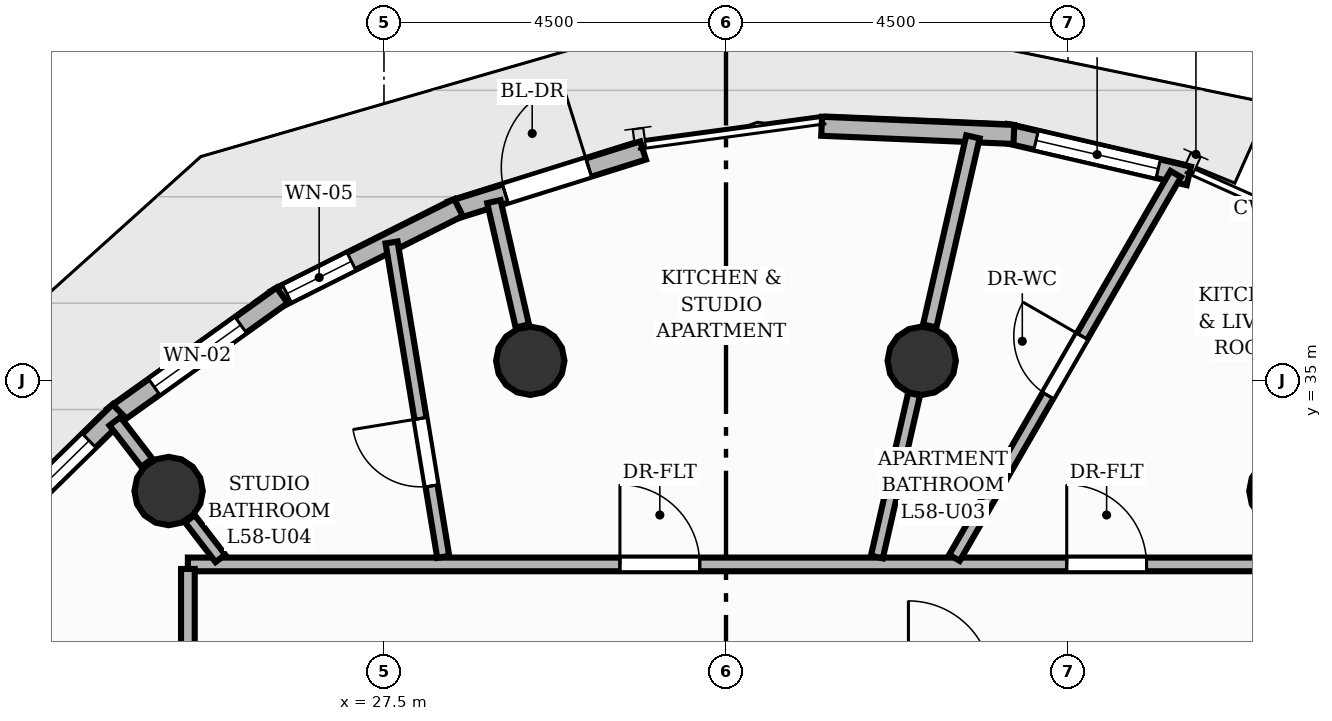
"""IFC4 building model, lengths in metres.
Left out: names, types, materials, properties, quantities, classifications, styles, units other than length and angle.
Written with IfcOpenShell. Run it as: python <this file> out.ifc"""

import sys

from ifc_helpers import new_model, si_unit, direction, frame, frame_2d, origin, origin_2d, place, context, subcontext, project, spatial, rectangle, circle, extrude, element, fill, save


model = new_model("IFC4")
c1 = context("Model", 3, precision=1e-05, world=origin(), true_north=direction((0.0, 1.0)))
c2 = subcontext(c1, "Body", "Model", "MODEL_VIEW")
j1 = project(units=[si_unit("LENGTHUNIT", "METRE"), si_unit("PLANEANGLEUNIT", "RADIAN")], contexts=[c1])
p1 = place(None, origin())
s1 = spatial("IfcSite", under=j1, at=p1, CompositionType="ELEMENT")
p2 = place(p1, origin())
s2 = spatial("IfcBuilding", under=s1, at=p2, CompositionType="ELEMENT")
p3 = place(p2, frame((0.0, 0.0, 195.04)))
s3 = spatial("IfcBuildingStorey", under=s2, at=p3, CompositionType="ELEMENT", Elevation=195.04)
for number, where, z_axis, x_axis in (
    (1, (39.333, 33.545, 0.0), (0.0, 0.0, 1.0), (1.0, 0.0, 0.0)),
    (2, (34.575, 35.26, 0.0), (0.0, 0.0, 1.0), (1.0, 0.0, 0.0)),
    (3, (29.425, 35.26, 0.0), (0.0, 0.0, 1.0), (1.0, 0.0, 0.0)),
    (4, (24.667, 33.545, 0.0), (0.0, 0.0, 1.0), (1.0, 0.0, 0.0)),
):
    element("IfcColumn", number, at=place(p3, frame(where, z_axis=z_axis, x_axis=x_axis)), inside=s3, PredefinedType="COLUMN", context=c2, shape_type="SweptSolid", body=[
        extrude(circle(Radius=0.45, at=origin_2d()), origin(), (0.0, 0.0, 1.0), 3.2),
    ])
p4 = place(p3, frame((35.676, 38.253, 0.0), z_axis=(0.0, 0.0, 1.0), x_axis=(0.974096425092, -0.226133046286, 0.0)))
e5 = element("IfcWall", 5, at=p4, inside=s3, PredefinedType="SOLIDWALL", context=c2, shape_type="SweptSolid", body=[
    extrude(rectangle(XDim=2.478, YDim=0.25, at=frame_2d((1.239, 0.0))), origin(), (0.0, 0.0, 1.0), 2.96),
])
p5 = place(p4, frame((0.414, 0.0, 0.85)))
e6 = element("IfcOpeningElement", 6, at=p5, cuts=e5, PredefinedType="OPENING", context=c2, shape_type="SweptSolid", body=[
    extrude(rectangle(XDim=1.65, YDim=1.55, at=frame_2d((0.825, 0.775))), frame((0.0, 0.135, 0.0), z_axis=(0.0, -1.0, 0.0), x_axis=(1.0, 0.0, 0.0)), (0.0, 0.0, 1.0), 0.27),
])
p6 = place(p3, frame((33.258, 38.345, 0.0), z_axis=(0.0, 0.0, 1.0), x_axis=(0.999099670747, -0.042424614469, 0.0)))
e7 = element("IfcWall", 7, at=p6, inside=s3, PredefinedType="SOLIDWALL", context=c2, shape_type="SweptSolid", body=[
    extrude(rectangle(XDim=2.532, YDim=0.25, at=frame_2d((1.266, 0.0))), origin(), (0.0, 0.0, 1.0), 2.96),
])
p7 = place(p3, frame((28.379, 37.234, 0.0), z_axis=(0.0, 0.0, 1.0), x_axis=(0.954307768746, 0.298825505122, 0.0)))
e8 = element("IfcWall", 8, at=p7, inside=s3, PredefinedType="SOLIDWALL", context=c2, shape_type="SweptSolid", body=[
    extrude(rectangle(XDim=2.651, YDim=0.25, at=frame_2d((1.326, 0.0))), origin(), (0.0, 0.0, 1.0), 2.96),
])
p8 = place(p7, frame((0.751, 0.0, 0.0)))
e9 = element("IfcOpeningElement", 9, at=p8, cuts=e8, PredefinedType="OPENING", context=c2, shape_type="SweptSolid", body=[
    extrude(rectangle(XDim=1.15, YDim=2.2, at=frame_2d((0.575, 1.1))), frame((0.0, 0.135, 0.0), z_axis=(0.0, -1.0, 0.0), x_axis=(1.0, 0.0, 0.0)), (0.0, 0.0, 1.0), 0.27),
])
p9 = place(p3, frame((26.066, 36.063, 0.0), z_axis=(0.0, 0.0, 1.0), x_axis=(0.893757522153, 0.448550433724, 0.0)))
e10 = element("IfcWall", 10, at=p9, inside=s3, PredefinedType="SOLIDWALL", context=c2, shape_type="SweptSolid", body=[
    extrude(rectangle(XDim=2.702, YDim=0.25, at=frame_2d((1.351, 0.0))), origin(), (0.0, 0.0, 1.0), 2.96),
])
p10 = place(p9, frame((0.175, 0.0, 0.85)))
e11 = element("IfcOpeningElement", 11, at=p10, cuts=e10, PredefinedType="OPENING", context=c2, shape_type="SweptSolid", body=[
    extrude(rectangle(XDim=0.95, YDim=1.45, at=frame_2d((0.475, 0.725))), frame((0.0, 0.135, 0.0), z_axis=(0.0, -1.0, 0.0), x_axis=(1.0, 0.0, 0.0)), (0.0, 0.0, 1.0), 0.27),
])
p11 = place(p3, frame((23.934, 34.526, 0.0), z_axis=(0.0, 0.0, 1.0), x_axis=(0.812997900305, 0.58226661771, 0.0)))
e12 = element("IfcWall", 12, at=p11, inside=s3, PredefinedType="SOLIDWALL", context=c2, shape_type="SweptSolid", body=[
    extrude(rectangle(XDim=2.739, YDim=0.25, at=frame_2d((1.369, 0.0))), origin(), (0.0, 0.0, 1.0), 2.96),
])
p12 = place(p11, frame((0.669, 0.0, 0.85)))
e13 = element("IfcOpeningElement", 13, at=p12, cuts=e12, PredefinedType="OPENING", context=c2, shape_type="SweptSolid", body=[
    extrude(rectangle(XDim=1.4, YDim=1.55, at=frame_2d((0.7, 0.775))), frame((0.0, 0.135, 0.0), z_axis=(0.0, -1.0, 0.0), x_axis=(1.0, 0.0, 0.0)), (0.0, 0.0, 1.0), 0.27),
])
p13 = place(p3, frame((22.045, 32.667, 0.0), z_axis=(0.0, 0.0, 1.0), x_axis=(0.71485422762, 0.699273503898, 0.0)))
e14 = element("IfcWall", 14, at=p13, inside=s3, PredefinedType="SOLIDWALL", context=c2, shape_type="SweptSolid", body=[
    extrude(rectangle(XDim=2.758, YDim=0.25, at=frame_2d((1.379, 0.0))), origin(), (0.0, 0.0, 1.0), 2.96),
])
p14 = place(p13, frame((0.554, 0.0, 0.85)))
e15 = element("IfcOpeningElement", 15, at=p14, cuts=e14, PredefinedType="OPENING", context=c2, shape_type="SweptSolid", body=[
    extrude(rectangle(XDim=1.65, YDim=1.55, at=frame_2d((0.825, 0.775))), frame((0.0, 0.135, 0.0), z_axis=(0.0, -1.0, 0.0), x_axis=(1.0, 0.0, 0.0)), (0.0, 0.0, 1.0), 0.27),
])
p15 = place(p3, frame((34.68, 35.718, 0.0), z_axis=(0.0, 0.0, 1.0), x_axis=(0.22299363946, 0.974819899654, 0.0)))
e16 = element("IfcWall", 16, at=p15, inside=s3, PredefinedType="PARTITIONING", context=c2, shape_type="SweptSolid", body=[
    extrude(rectangle(XDim=2.552, YDim=0.18, at=frame_2d((1.276, 0.0))), origin(), (0.0, 0.0, 1.0), 2.403),
])
p16 = place(p3, frame((29.32, 35.718, 0.0), z_axis=(0.0, 0.0, 1.0), x_axis=(-0.222978827263, 0.97482328788, 0.0)))
e17 = element("IfcWall", 17, at=p16, inside=s3, PredefinedType="PARTITIONING", context=c2, shape_type="SweptSolid", body=[
    extrude(rectangle(XDim=1.678, YDim=0.18, at=frame_2d((0.839, 0.0))), origin(), (0.0, 0.0, 1.0), 2.403),
])
p17 = place(p3, frame((24.38, 33.918, 0.0), z_axis=(0.0, 0.0, 1.0), x_axis=(-0.60904199592, 0.793137974885, 0.0)))
e18 = element("IfcWall", 18, at=p17, inside=s3, PredefinedType="PARTITIONING", context=c2, shape_type="SweptSolid", body=[
    extrude(rectangle(XDim=0.688, YDim=0.18, at=frame_2d((0.344, 0.0))), origin(), (0.0, 0.0, 1.0), 2.403),
])
p18 = place(p3, frame((24.92, 32.58, 0.0), z_axis=(0.0, 0.0, 1.0), x_axis=(1.0, 0.0, 0.0)))
e19 = element("IfcWall", 19, at=p18, inside=s3, PredefinedType="PARTITIONING", context=c2, shape_type="SweptSolid", body=[
    extrude(rectangle(XDim=14.16, YDim=0.18, at=frame_2d((7.08, 0.0))), origin(), (0.0, 0.0, 1.0), 2.955),
])
p19 = place(p18, frame((11.563, 0.0, 0.0)))
e20 = element("IfcOpeningElement", 20, at=p19, cuts=e19, PredefinedType="OPENING", context=c2, shape_type="SweptSolid", body=[
    extrude(rectangle(XDim=1.05, YDim=2.15, at=frame_2d((0.525, 1.075))), frame((0.0, 0.1, 0.0), z_axis=(0.0, -1.0, 0.0), x_axis=(1.0, 0.0, 0.0)), (0.0, 0.0, 1.0), 0.2),
])
p20 = place(p18, frame((5.684, 0.0, 0.0)))
e21 = element("IfcOpeningElement", 21, at=p20, cuts=e19, PredefinedType="OPENING", context=c2, shape_type="SweptSolid", body=[
    extrude(rectangle(XDim=1.05, YDim=2.15, at=frame_2d((0.525, 1.075))), frame((0.0, 0.1, 0.0), z_axis=(0.0, -1.0, 0.0), x_axis=(1.0, 0.0, 0.0)), (0.0, 0.0, 1.0), 0.2),
])
p21 = place(p3, frame((24.92, 26.46, 0.0), z_axis=(0.0, 0.0, 1.0), x_axis=(0.0, 1.0, 0.0)))
e22 = element("IfcWall", 22, at=p21, inside=s3, PredefinedType="PARTITIONING", context=c2, shape_type="SweptSolid", body=[
    extrude(rectangle(XDim=6.06, YDim=0.18, at=frame_2d((3.03, 0.0))), origin(), (0.0, 0.0, 1.0), 2.955),
])
p22 = place(p3, frame((35.005, 32.667, 0.0), z_axis=(0.0, 0.0, 1.0), x_axis=(0.499495237235, 0.866316632635, 0.0)))
e23 = element("IfcWall", 23, at=p22, inside=s3, PredefinedType="PLUMBINGWALL", context=c2, shape_type="SweptSolid", body=[
    extrude(rectangle(XDim=5.83, YDim=0.16, at=frame_2d((2.915, 0.0))), origin(), (0.0, 0.0, 1.0), 2.692),
])
p23 = place(p22, frame((2.465, 0.0, 0.0)))
e24 = element("IfcOpeningElement", 24, at=p23, cuts=e23, PredefinedType="OPENING", context=c2, shape_type="SweptSolid", body=[
    extrude(rectangle(XDim=0.9, YDim=2.1, at=frame_2d((0.45, 1.05))), frame((0.0, 0.09, 0.0), z_axis=(0.0, -1.0, 0.0), x_axis=(1.0, 0.0, 0.0)), (0.0, 0.0, 1.0), 0.18),
])
p24 = place(p3, frame((33.985, 32.677, 0.0), z_axis=(0.0, 0.0, 1.0), x_axis=(0.222969522248, 0.974825416241, 0.0)))
e25 = element("IfcWall", 25, at=p24, inside=s3, PredefinedType="PLUMBINGWALL", context=c2, shape_type="SweptSolid", body=[
    extrude(rectangle(XDim=2.199, YDim=0.16, at=frame_2d((1.099, 0.0))), origin(), (0.0, 0.0, 1.0), 2.403),
])
p25 = place(p3, frame((28.28, 32.679, 0.0), z_axis=(0.0, 0.0, 1.0), x_axis=(-0.162160778545, 0.986764349732, 0.0)))
e26 = element("IfcWall", 26, at=p25, inside=s3, PredefinedType="PLUMBINGWALL", context=c2, shape_type="SweptSolid", body=[
    extrude(rectangle(XDim=4.193, YDim=0.16, at=frame_2d((2.096, 0.0))), origin(), (0.0, 0.0, 1.0), 2.692),
])
p26 = place(p25, frame((0.947, 0.0, 0.0)))
e27 = element("IfcOpeningElement", 27, at=p26, cuts=e26, PredefinedType="OPENING", context=c2, shape_type="SweptSolid", body=[
    extrude(rectangle(XDim=0.9, YDim=2.1, at=frame_2d((0.45, 1.05))), frame((0.0, 0.09, 0.0), z_axis=(0.0, -1.0, 0.0), x_axis=(1.0, 0.0, 0.0)), (0.0, 0.0, 1.0), 0.18),
])
p27 = place(p3, frame((25.347, 32.659, 0.0), z_axis=(0.0, 0.0, 1.0), x_axis=(-0.609101063055, 0.79309261438, 0.0)))
e28 = element("IfcWall", 28, at=p27, inside=s3, PredefinedType="PLUMBINGWALL", context=c2, shape_type="SweptSolid", body=[
    extrude(rectangle(XDim=0.658, YDim=0.16, at=frame_2d((0.329, 0.0))), origin(), (0.0, 0.0, 1.0), 2.403),
])
p28 = place(p8, origin())
e29 = element("IfcDoor", 29, at=p28, inside=s3, OperationType="SINGLE_SWING_RIGHT", PredefinedType="DOOR", context=c2, shape_type="SweptSolid", body=[
    extrude(rectangle(XDim=1.15, YDim=2.2, at=frame_2d((0.575, 1.1))), frame((0.0, 0.025, 0.0), z_axis=(0.0, -1.0, 0.0), x_axis=(1.0, 0.0, 0.0)), (0.0, 0.0, 1.0), 0.05),
])
fill(e9, e29)
p29 = place(p5, origin())
e30 = element("IfcWindow", 30, at=p29, inside=s3, PartitioningType="SINGLE_PANEL", PredefinedType="WINDOW", context=c2, shape_type="SweptSolid", body=[
    extrude(rectangle(XDim=1.65, YDim=1.55, at=frame_2d((0.825, 0.775))), frame((0.0, 0.03, 0.0), z_axis=(0.0, -1.0, 0.0), x_axis=(1.0, 0.0, 0.0)), (0.0, 0.0, 1.0), 0.06),
])
fill(e6, e30)
p30 = place(p10, origin())
e31 = element("IfcWindow", 31, at=p30, inside=s3, PartitioningType="SINGLE_PANEL", PredefinedType="WINDOW", context=c2, shape_type="SweptSolid", body=[
    extrude(rectangle(XDim=0.95, YDim=1.45, at=frame_2d((0.475, 0.725))), frame((0.0, 0.03, 0.0), z_axis=(0.0, -1.0, 0.0), x_axis=(1.0, 0.0, 0.0)), (0.0, 0.0, 1.0), 0.06),
])
fill(e11, e31)
p31 = place(p12, origin())
e32 = element("IfcWindow", 32, at=p31, inside=s3, PartitioningType="SINGLE_PANEL", PredefinedType="WINDOW", context=c2, shape_type="SweptSolid", body=[
    extrude(rectangle(XDim=1.4, YDim=1.55, at=frame_2d((0.7, 0.775))), frame((0.0, 0.03, 0.0), z_axis=(0.0, -1.0, 0.0), x_axis=(1.0, 0.0, 0.0)), (0.0, 0.0, 1.0), 0.06),
])
fill(e13, e32)
p32 = place(p14, origin())
e33 = element("IfcWindow", 33, at=p32, inside=s3, PartitioningType="SINGLE_PANEL", PredefinedType="WINDOW", context=c2, shape_type="SweptSolid", body=[
    extrude(rectangle(XDim=1.65, YDim=1.55, at=frame_2d((0.825, 0.775))), frame((0.0, 0.03, 0.0), z_axis=(0.0, -1.0, 0.0), x_axis=(1.0, 0.0, 0.0)), (0.0, 0.0, 1.0), 0.06),
])
fill(e15, e33)
p33 = place(p19, origin())
e34 = element("IfcDoor", 34, at=p33, inside=s3, OperationType="SINGLE_SWING_LEFT", PredefinedType="DOOR", context=c2, shape_type="SweptSolid", body=[
    extrude(rectangle(XDim=1.05, YDim=2.15, at=frame_2d((0.525, 1.075))), frame((0.0, 0.025, 0.0), z_axis=(0.0, -1.0, 0.0), x_axis=(1.0, 0.0, 0.0)), (0.0, 0.0, 1.0), 0.05),
])
fill(e20, e34)
p34 = place(p23, origin())
e35 = element("IfcDoor", 35, at=p34, inside=s3, OperationType="SINGLE_SWING_RIGHT", PredefinedType="DOOR", context=c2, shape_type="SweptSolid", body=[
    extrude(rectangle(XDim=0.9, YDim=2.1, at=frame_2d((0.45, 1.05))), frame((0.0, 0.025, 0.0), z_axis=(0.0, -1.0, 0.0), x_axis=(1.0, 0.0, 0.0)), (0.0, 0.0, 1.0), 0.05),
])
fill(e24, e35)
p35 = place(p20, origin())
e36 = element("IfcDoor", 36, at=p35, inside=s3, OperationType="SINGLE_SWING_LEFT", PredefinedType="DOOR", context=c2, shape_type="SweptSolid", body=[
    extrude(rectangle(XDim=1.05, YDim=2.15, at=frame_2d((0.525, 1.075))), frame((0.0, 0.025, 0.0), z_axis=(0.0, -1.0, 0.0), x_axis=(1.0, 0.0, 0.0)), (0.0, 0.0, 1.0), 0.05),
])
fill(e21, e36)
p36 = place(p26, origin())
e37 = element("IfcDoor", 37, at=p36, inside=s3, OperationType="SINGLE_SWING_RIGHT", PredefinedType="DOOR", context=c2, shape_type="SweptSolid", body=[
    extrude(rectangle(XDim=0.9, YDim=2.1, at=frame_2d((0.45, 1.05))), frame((0.0, 0.025, 0.0), z_axis=(0.0, -1.0, 0.0), x_axis=(1.0, 0.0, 0.0)), (0.0, 0.0, 1.0), 0.05),
])
fill(e27, e37)
save(model, sys.argv[1])
